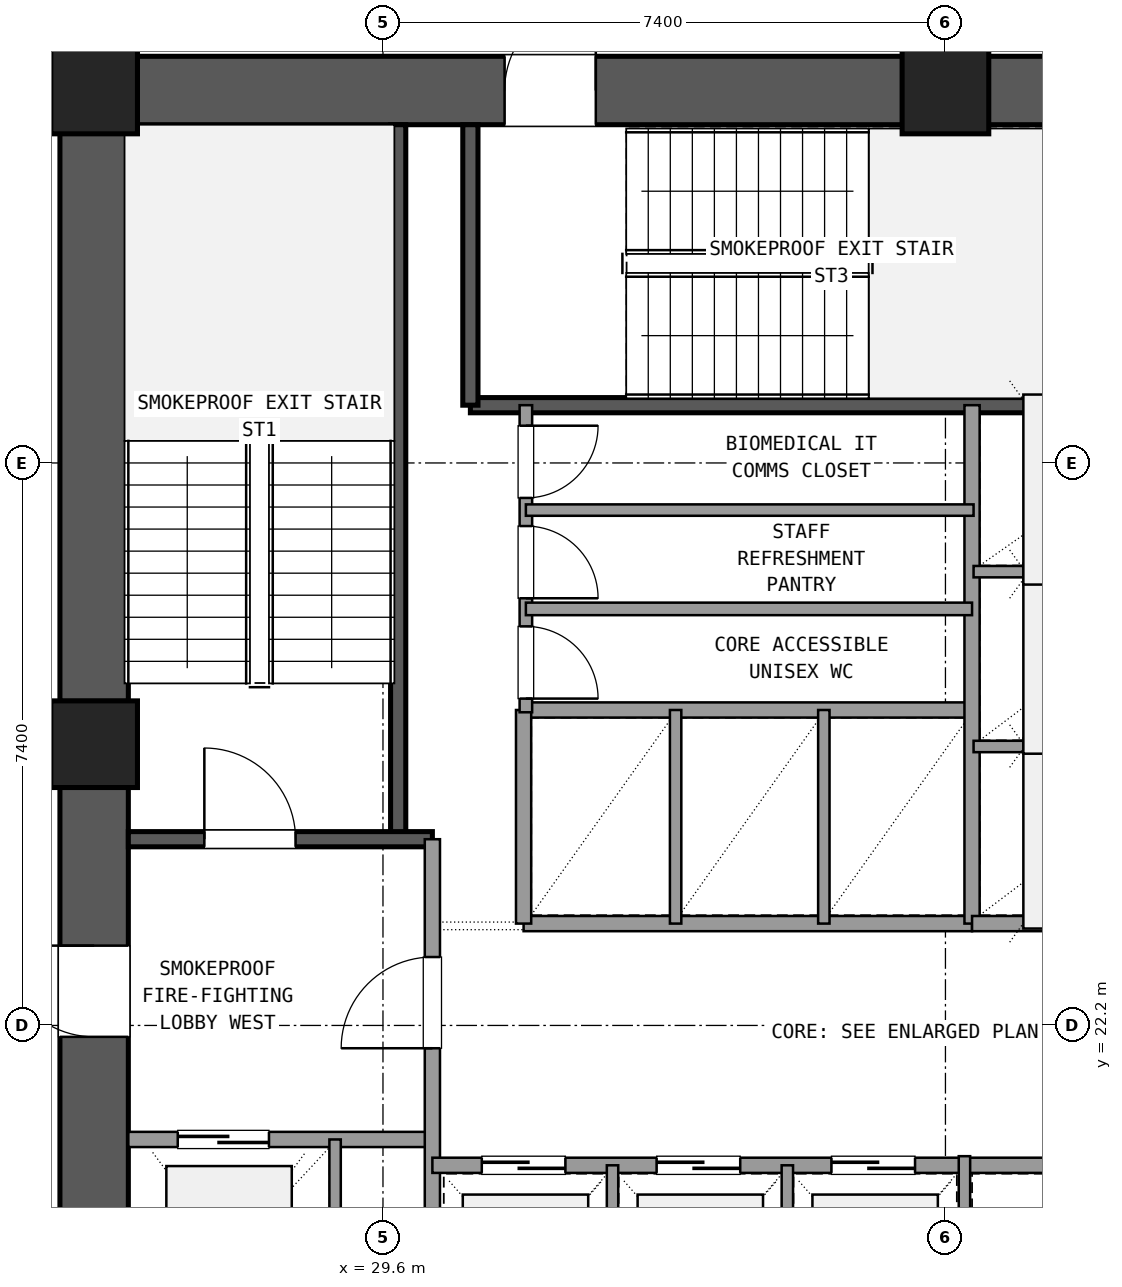
"""IFC4 building model, lengths in metres.
Left out: names, types, materials, properties, quantities, classifications, styles, units other than length and angle.
Written with IfcOpenShell. Run it as: python <this file> out.ifc"""

import sys

from ifc_helpers import new_model, si_unit, direction, frame, frame_2d, origin, origin_2d, place, context, subcontext, project, spatial, rectangle, extrude, element, fill, save


model = new_model("IFC4")
c1 = context("Model", 3, precision=1e-05, world=origin(), true_north=direction((0.0, 1.0)))
c2 = subcontext(c1, "Body", "Model", "MODEL_VIEW")
j1 = project(units=[si_unit("LENGTHUNIT", "METRE"), si_unit("PLANEANGLEUNIT", "RADIAN")], contexts=[c1])
p1 = place(None, origin())
s1 = spatial("IfcSite", under=j1, at=p1, CompositionType="ELEMENT")
p2 = place(p1, origin())
s2 = spatial("IfcBuilding", under=s1, at=p2, CompositionType="ELEMENT")
p3 = place(p2, frame((0.0, 0.0, 14.4)))
s3 = spatial("IfcBuildingStorey", under=s2, at=p3, CompositionType="ELEMENT", Elevation=14.4)
for number, where, z_axis, x_axis in (
    (1, (37.0, 34.5, 0.0), (0.0, 0.0, 1.0), (1.0, 0.0, 0.0)),
    (2, (25.8, 34.5, 0.0), (0.0, 0.0, 1.0), (1.0, 0.0, 0.0)),
    (3, (25.8, 25.9, 0.0), (0.0, 0.0, 1.0), (1.0, 0.0, 0.0)),
):
    element("IfcColumn", number, at=place(p3, frame(where, z_axis=z_axis, x_axis=x_axis)), inside=s3, PredefinedType="COLUMN", context=c2, shape_type="SweptSolid", body=[
        extrude(rectangle(XDim=1.14, YDim=1.14, at=origin_2d()), origin(), (0.0, 0.0, 1.0), 4.5),
    ])
p4 = place(p3, frame((47.635, 34.5, 0.0), z_axis=(0.0, 0.0, 1.0), x_axis=(-1.0, 0.0, 0.0)))
e4 = element("IfcWall", 4, at=p4, inside=s3, PredefinedType="SHEAR", context=c2, shape_type="SweptSolid", body=[
    extrude(rectangle(XDim=10.07, YDim=0.9, at=frame_2d((5.035, 0.0))), origin(), (0.0, 0.0, 1.0), 4.2),
])
p5 = place(p4, frame((4.535, 0.0, 0.0)))
e5 = element("IfcOpeningElement", 5, at=p5, cuts=e4, PredefinedType="OPENING", context=c2, shape_type="SweptSolid", body=[
    extrude(rectangle(XDim=1.6, YDim=2.2, at=frame_2d((0.8, 1.1))), frame((0.0, 0.46, 0.0), z_axis=(0.0, -1.0, 0.0), x_axis=(1.0, 0.0, 0.0)), (0.0, 0.0, 1.0), 0.92),
])
p6 = place(p3, frame((36.435, 34.5, 0.0), z_axis=(0.0, 0.0, 1.0), x_axis=(-1.0, 0.0, 0.0)))
e6 = element("IfcWall", 6, at=p6, inside=s3, PredefinedType="SHEAR", context=c2, shape_type="SweptSolid", body=[
    extrude(rectangle(XDim=10.07, YDim=0.9, at=frame_2d((5.035, 0.0))), origin(), (0.0, 0.0, 1.0), 4.2),
])
p7 = place(p6, frame((4.035, 0.0, 0.0)))
e7 = element("IfcOpeningElement", 7, at=p7, cuts=e6, PredefinedType="OPENING", context=c2, shape_type="SweptSolid", body=[
    extrude(rectangle(XDim=1.2, YDim=2.15, at=frame_2d((0.6, 1.075))), frame((0.0, 0.46, 0.0), z_axis=(0.0, -1.0, 0.0), x_axis=(1.0, 0.0, 0.0)), (0.0, 0.0, 1.0), 0.92),
])
p8 = place(p3, frame((25.8, 33.935, 0.0), z_axis=(0.0, 0.0, 1.0), x_axis=(0.0, -1.0, 0.0)))
e8 = element("IfcWall", 8, at=p8, inside=s3, PredefinedType="SHEAR", context=c2, shape_type="SweptSolid", body=[
    extrude(rectangle(XDim=7.47, YDim=0.9, at=frame_2d((3.735, 0.0))), origin(), (0.0, 0.0, 1.0), 4.2),
])
p9 = place(p3, frame((25.8, 25.335, 0.0), z_axis=(0.0, 0.0, 1.0), x_axis=(0.0, -1.0, 0.0)))
e9 = element("IfcWall", 9, at=p9, inside=s3, PredefinedType="SHEAR", context=c2, shape_type="SweptSolid", body=[
    extrude(rectangle(XDim=7.47, YDim=0.9, at=frame_2d((3.735, 0.0))), origin(), (0.0, 0.0, 1.0), 4.2),
])
p10 = place(p9, frame((2.085, 0.0, 0.0)))
e10 = element("IfcOpeningElement", 10, at=p10, cuts=e9, PredefinedType="OPENING", context=c2, shape_type="SweptSolid", body=[
    extrude(rectangle(XDim=1.2, YDim=2.15, at=frame_2d((0.6, 1.075))), frame((0.0, 0.46, 0.0), z_axis=(0.0, -1.0, 0.0), x_axis=(1.0, 0.0, 0.0)), (0.0, 0.0, 1.0), 0.92),
])
p11 = place(p3, frame((29.8, 24.65, 0.0), z_axis=(0.0, 0.0, 1.0), x_axis=(0.0, 1.0, 0.0)))
e11 = element("IfcWall", 11, at=p11, inside=s3, PredefinedType="SHEAR", context=c2, shape_type="SweptSolid", body=[
    extrude(rectangle(XDim=9.4, YDim=0.2, at=frame_2d((4.7, 0.0))), origin(), (0.0, 0.0, 1.0), 4.2),
])
p12 = place(p3, frame((26.25, 24.65, 0.0), z_axis=(0.0, 0.0, 1.0), x_axis=(1.0, 0.0, 0.0)))
e12 = element("IfcWall", 12, at=p12, inside=s3, PredefinedType="SHEAR", context=c2, shape_type="SweptSolid", body=[
    extrude(rectangle(XDim=4.0, YDim=0.2, at=frame_2d((2.0, 0.0))), origin(), (0.0, 0.0, 1.0), 4.2),
])
p13 = place(p12, frame((1.0, 0.0, 0.0)))
e13 = element("IfcOpeningElement", 13, at=p13, cuts=e12, PredefinedType="OPENING", context=c2, shape_type="SweptSolid", body=[
    extrude(rectangle(XDim=1.2, YDim=2.15, at=frame_2d((0.6, 1.075))), frame((0.0, 0.11, 0.0), z_axis=(0.0, -1.0, 0.0), x_axis=(1.0, 0.0, 0.0)), (0.0, 0.0, 1.0), 0.22),
])
p14 = place(p3, frame((30.75, 30.36, 0.0), z_axis=(0.0, 0.0, 1.0), x_axis=(1.0, 0.0, 0.0)))
e14 = element("IfcWall", 14, at=p14, inside=s3, PredefinedType="SHEAR", context=c2, shape_type="SweptSolid", body=[
    extrude(rectangle(XDim=9.5, YDim=0.2, at=frame_2d((4.75, 0.0))), origin(), (0.0, 0.0, 1.0), 4.2),
])
p15 = place(p3, frame((30.75, 30.36, 0.0), z_axis=(0.0, 0.0, 1.0), x_axis=(0.0, 1.0, 0.0)))
e15 = element("IfcWall", 15, at=p15, inside=s3, PredefinedType="SHEAR", context=c2, shape_type="SweptSolid", body=[
    extrude(rectangle(XDim=3.69, YDim=0.2, at=frame_2d((1.845, 0.0))), origin(), (0.0, 0.0, 1.0), 4.2),
])
p16 = place(p3, frame((26.25, 20.7, 0.0), z_axis=(0.0, 0.0, 1.0), x_axis=(1.0, 0.0, 0.0)))
e16 = element("IfcWall", 16, at=p16, inside=s3, PredefinedType="SOLIDWALL", context=c2, shape_type="SweptSolid", body=[
    extrude(rectangle(XDim=4.0, YDim=0.2, at=frame_2d((2.0, 0.0))), origin(), (0.0, 0.0, 1.0), 3.21),
])
p17 = place(p16, frame((0.65, 0.0, 0.0)))
e17 = element("IfcOpeningElement", 17, at=p17, cuts=e16, PredefinedType="OPENING", context=c2, shape_type="SweptSolid", body=[
    extrude(rectangle(XDim=1.2, YDim=2.15, at=frame_2d((0.6, 1.075))), frame((0.0, 0.11, 0.0), z_axis=(0.0, -1.0, 0.0), x_axis=(1.0, 0.0, 0.0)), (0.0, 0.0, 1.0), 0.22),
])
p18 = place(p3, frame((30.25, 17.75, 0.0), z_axis=(0.0, 0.0, 1.0), x_axis=(0.0, 1.0, 0.0)))
e18 = element("IfcWall", 18, at=p18, inside=s3, PredefinedType="SOLIDWALL", context=c2, shape_type="SweptSolid", body=[
    extrude(rectangle(XDim=6.9, YDim=0.2, at=frame_2d((3.45, 0.0))), origin(), (0.0, 0.0, 1.0), 3.21),
])
p19 = place(p18, frame((4.15, 0.0, 0.0)))
e19 = element("IfcOpeningElement", 19, at=p19, cuts=e18, PredefinedType="OPENING", context=c2, shape_type="SweptSolid", body=[
    extrude(rectangle(XDim=1.2, YDim=2.15, at=frame_2d((0.6, 1.075))), frame((0.0, 0.11, 0.0), z_axis=(0.0, -1.0, 0.0), x_axis=(1.0, 0.0, 0.0)), (0.0, 0.0, 1.0), 0.22),
])
p20 = place(p3, frame((28.97, 17.75, 0.0), z_axis=(0.0, 0.0, 1.0), x_axis=(0.0, 1.0, 0.0)))
e20 = element("IfcWall", 20, at=p20, inside=s3, PredefinedType="PARTITIONING", context=c2, shape_type="SweptSolid", body=[
    extrude(rectangle(XDim=2.95, YDim=0.15, at=frame_2d((1.475, 0.0))), origin(), (0.0, 0.0, 1.0), 3.21),
])
p21 = place(p3, frame((30.25, 20.36, 0.0), z_axis=(0.0, 0.0, 1.0), x_axis=(1.0, 0.0, 0.0)))
e21 = element("IfcWall", 21, at=p21, inside=s3, PredefinedType="SOLIDWALL", context=c2, shape_type="SweptSolid", body=[
    extrude(rectangle(XDim=7.0, YDim=0.2, at=frame_2d((3.5, 0.0))), origin(), (0.0, 0.0, 1.0), 3.21),
])
p22 = place(p21, frame((0.65, 0.0, 0.0)))
e22 = element("IfcOpeningElement", 22, at=p22, cuts=e21, PredefinedType="OPENING", context=c2, shape_type="SweptSolid", body=[
    extrude(rectangle(XDim=1.1, YDim=2.15, at=frame_2d((0.55, 1.075))), frame((0.0, 0.11, 0.0), z_axis=(0.0, -1.0, 0.0), x_axis=(1.0, 0.0, 0.0)), (0.0, 0.0, 1.0), 0.22),
])
p23 = place(p21, frame((2.95, 0.0, 0.0)))
e23 = element("IfcOpeningElement", 23, at=p23, cuts=e21, PredefinedType="OPENING", context=c2, shape_type="SweptSolid", body=[
    extrude(rectangle(XDim=1.1, YDim=2.15, at=frame_2d((0.55, 1.075))), frame((0.0, 0.11, 0.0), z_axis=(0.0, -1.0, 0.0), x_axis=(1.0, 0.0, 0.0)), (0.0, 0.0, 1.0), 0.22),
])
p24 = place(p21, frame((5.25, 0.0, 0.0)))
e24 = element("IfcOpeningElement", 24, at=p24, cuts=e21, PredefinedType="OPENING", context=c2, shape_type="SweptSolid", body=[
    extrude(rectangle(XDim=1.1, YDim=2.15, at=frame_2d((0.55, 1.075))), frame((0.0, 0.11, 0.0), z_axis=(0.0, -1.0, 0.0), x_axis=(1.0, 0.0, 0.0)), (0.0, 0.0, 1.0), 0.22),
])
for number, where, z_axis, x_axis in (
    (25, (32.62, 17.75, 0.0), (0.0, 0.0, 1.0), (0.0, 1.0, 0.0)),
    (26, (34.92, 17.75, 0.0), (0.0, 0.0, 1.0), (0.0, 1.0, 0.0)),
):
    element("IfcWall", number, at=place(p3, frame(where, z_axis=z_axis, x_axis=x_axis)), inside=s3, PredefinedType="PARTITIONING", context=c2, shape_type="SweptSolid", body=[
        extrude(rectangle(XDim=2.61, YDim=0.15, at=frame_2d((1.305, 0.0))), origin(), (0.0, 0.0, 1.0), 3.21),
    ])
p25 = place(p3, frame((37.25, 20.36, 0.0), z_axis=(0.0, 0.0, 1.0), x_axis=(1.0, 0.0, 0.0)))
e27 = element("IfcWall", 27, at=p25, inside=s3, PredefinedType="SOLIDWALL", context=c2, shape_type="SweptSolid", body=[
    extrude(rectangle(XDim=6.1, YDim=0.2, at=frame_2d((3.05, 0.0))), origin(), (0.0, 0.0, 1.0), 3.21),
])
p26 = place(p3, frame((37.25, 17.75, 0.0), z_axis=(0.0, 0.0, 1.0), x_axis=(0.0, 1.0, 0.0)))
e28 = element("IfcWall", 28, at=p26, inside=s3, PredefinedType="PARTITIONING", context=c2, shape_type="SweptSolid", body=[
    extrude(rectangle(XDim=2.73, YDim=0.15, at=frame_2d((1.365, 0.0))), origin(), (0.0, 0.0, 1.0), 3.21),
])
for number, where, z_axis, x_axis in (
    (29, (31.45, 23.54, 0.0), (0.0, 0.0, 1.0), (1.0, 0.0, 0.0)),
    (30, (31.45, 26.35, 0.0), (0.0, 0.0, 1.0), (1.0, 0.0, 0.0)),
):
    element("IfcWall", number, at=place(p3, frame(where, z_axis=z_axis, x_axis=x_axis)), inside=s3, PredefinedType="SOLIDWALL", context=c2, shape_type="SweptSolid", body=[
        extrude(rectangle(XDim=5.9, YDim=0.2, at=frame_2d((2.95, 0.0))), origin(), (0.0, 0.0, 1.0), 3.21),
    ])
p27 = place(p3, frame((31.45, 23.54, 0.0), z_axis=(0.0, 0.0, 1.0), x_axis=(0.0, 1.0, 0.0)))
e31 = element("IfcWall", 31, at=p27, inside=s3, PredefinedType="SOLIDWALL", context=c2, shape_type="SweptSolid", body=[
    extrude(rectangle(XDim=2.81, YDim=0.2, at=frame_2d((1.405, 0.0))), origin(), (0.0, 0.0, 1.0), 3.21),
])
for number, where, z_axis, x_axis in (
    (32, (33.45, 23.54, 0.0), (0.0, 0.0, 1.0), (0.0, 1.0, 0.0)),
    (33, (35.4, 23.54, 0.0), (0.0, 0.0, 1.0), (0.0, 1.0, 0.0)),
):
    element("IfcWall", number, at=place(p3, frame(where, z_axis=z_axis, x_axis=x_axis)), inside=s3, PredefinedType="PARTITIONING", context=c2, shape_type="SweptSolid", body=[
        extrude(rectangle(XDim=2.81, YDim=0.15, at=frame_2d((1.405, 0.0))), origin(), (0.0, 0.0, 1.0), 3.21),
    ])
p28 = place(p3, frame((37.35, 23.54, 0.0), z_axis=(0.0, 0.0, 1.0), x_axis=(0.0, 1.0, 0.0)))
e34 = element("IfcWall", 34, at=p28, inside=s3, PredefinedType="SOLIDWALL", context=c2, shape_type="SweptSolid", body=[
    extrude(rectangle(XDim=6.82, YDim=0.2, at=frame_2d((3.41, 0.0))), origin(), (0.0, 0.0, 1.0), 3.21),
])
p29 = place(p3, frame((37.35, 23.54, 0.0), z_axis=(0.0, 0.0, 1.0), x_axis=(1.0, 0.0, 0.0)))
e35 = element("IfcWall", 35, at=p29, inside=s3, PredefinedType="SOLIDWALL", context=c2, shape_type="SweptSolid", body=[
    extrude(rectangle(XDim=3.05, YDim=0.2, at=frame_2d((1.525, 0.0))), origin(), (0.0, 0.0, 1.0), 3.21),
])
for number, where, z_axis, x_axis in (
    (36, (37.37, 25.87, 0.0), (0.0, 0.0, 1.0), (1.0, 0.0, 0.0)),
    (37, (37.37, 28.17, 0.0), (0.0, 0.0, 1.0), (1.0, 0.0, 0.0)),
):
    element("IfcWall", number, at=place(p3, frame(where, z_axis=z_axis, x_axis=x_axis)), inside=s3, PredefinedType="PARTITIONING", context=c2, shape_type="SweptSolid", body=[
        extrude(rectangle(XDim=3.01, YDim=0.15, at=frame_2d((1.505, 0.0))), origin(), (0.0, 0.0, 1.0), 3.21),
    ])
p30 = place(p3, frame((31.48, 26.32, 0.0), z_axis=(0.0, 0.0, 1.0), x_axis=(0.0, 1.0, 0.0)))
e38 = element("IfcWall", 38, at=p30, inside=s3, PredefinedType="PLUMBINGWALL", context=c2, shape_type="SweptSolid", body=[
    extrude(rectangle(XDim=4.04, YDim=0.165, at=frame_2d((2.02, 0.0))), origin(), (0.0, 0.0, 1.0), 3.21),
])
p31 = place(p30, frame((0.18, 0.0, 0.0)))
e39 = element("IfcOpeningElement", 39, at=p31, cuts=e38, PredefinedType="OPENING", context=c2, shape_type="SweptSolid", body=[
    extrude(rectangle(XDim=0.95, YDim=2.1, at=frame_2d((0.475, 1.05))), frame((0.0, 0.093, 0.0), z_axis=(0.0, -1.0, 0.0), x_axis=(1.0, 0.0, 0.0)), (0.0, 0.0, 1.0), 0.185),
])
p32 = place(p30, frame((1.5, 0.0, 0.0)))
e40 = element("IfcOpeningElement", 40, at=p32, cuts=e38, PredefinedType="OPENING", context=c2, shape_type="SweptSolid", body=[
    extrude(rectangle(XDim=0.95, YDim=2.1, at=frame_2d((0.475, 1.05))), frame((0.0, 0.093, 0.0), z_axis=(0.0, -1.0, 0.0), x_axis=(1.0, 0.0, 0.0)), (0.0, 0.0, 1.0), 0.185),
])
p33 = place(p30, frame((2.82, 0.0, 0.0)))
e41 = element("IfcOpeningElement", 41, at=p33, cuts=e38, PredefinedType="OPENING", context=c2, shape_type="SweptSolid", body=[
    extrude(rectangle(XDim=0.95, YDim=2.1, at=frame_2d((0.475, 1.05))), frame((0.0, 0.093, 0.0), z_axis=(0.0, -1.0, 0.0), x_axis=(1.0, 0.0, 0.0)), (0.0, 0.0, 1.0), 0.185),
])
p34 = place(p3, frame((31.48, 27.68, 0.0), z_axis=(0.0, 0.0, 1.0), x_axis=(1.0, 0.0, 0.0)))
e42 = element("IfcWall", 42, at=p34, inside=s3, PredefinedType="PLUMBINGWALL", context=c2, shape_type="SweptSolid", body=[
    extrude(rectangle(XDim=5.87, YDim=0.165, at=frame_2d((2.935, 0.0))), origin(), (0.0, 0.0, 1.0), 3.21),
])
p35 = place(p3, frame((31.48, 28.98, 0.0), z_axis=(0.0, 0.0, 1.0), x_axis=(1.0, 0.0, 0.0)))
e43 = element("IfcWall", 43, at=p35, inside=s3, PredefinedType="PARTITIONING", context=c2, shape_type="SweptSolid", body=[
    extrude(rectangle(XDim=5.89, YDim=0.15, at=frame_2d((2.945, 0.0))), origin(), (0.0, 0.0, 1.0), 3.21),
])
p36 = place(p13, origin())
e44 = element("IfcDoor", 44, at=p36, inside=s3, OperationType="SINGLE_SWING_LEFT", PredefinedType="DOOR", context=c2, shape_type="SweptSolid", body=[
    extrude(rectangle(XDim=1.2, YDim=2.15, at=frame_2d((0.6, 1.075))), frame((0.0, 0.025, 0.0), z_axis=(0.0, -1.0, 0.0), x_axis=(1.0, 0.0, 0.0)), (0.0, 0.0, 1.0), 0.05),
])
fill(e13, e44)
p37 = place(p17, origin())
e45 = element("IfcDoor", 45, at=p37, inside=s3, OperationType="SLIDING_TO_LEFT", PredefinedType="DOOR", context=c2, shape_type="SweptSolid", body=[
    extrude(rectangle(XDim=1.2, YDim=2.15, at=frame_2d((0.6, 1.075))), frame((0.0, 0.025, 0.0), z_axis=(0.0, -1.0, 0.0), x_axis=(1.0, 0.0, 0.0)), (0.0, 0.0, 1.0), 0.05),
])
fill(e17, e45)
p38 = place(p19, origin())
e46 = element("IfcDoor", 46, at=p38, inside=s3, OperationType="SINGLE_SWING_LEFT", PredefinedType="DOOR", context=c2, shape_type="SweptSolid", body=[
    extrude(rectangle(XDim=1.2, YDim=2.15, at=frame_2d((0.6, 1.075))), frame((0.0, 0.025, 0.0), z_axis=(0.0, -1.0, 0.0), x_axis=(1.0, 0.0, 0.0)), (0.0, 0.0, 1.0), 0.05),
])
fill(e19, e46)
p39 = place(p10, frame((1.2, 0.0, 0.0), z_axis=(0.0, 0.0, 1.0), x_axis=(-1.0, 0.0, 0.0)))
e47 = element("IfcDoor", 47, at=p39, inside=s3, OperationType="SINGLE_SWING_LEFT", PredefinedType="DOOR", context=c2, shape_type="SweptSolid", body=[
    extrude(rectangle(XDim=1.2, YDim=2.15, at=frame_2d((0.6, 1.075))), frame((0.0, 0.025, 0.0), z_axis=(0.0, -1.0, 0.0), x_axis=(1.0, 0.0, 0.0)), (0.0, 0.0, 1.0), 0.05),
])
fill(e10, e47)
p40 = place(p7, frame((1.2, 0.0, 0.0), z_axis=(0.0, 0.0, 1.0), x_axis=(-1.0, 0.0, 0.0)))
e48 = element("IfcDoor", 48, at=p40, inside=s3, OperationType="SINGLE_SWING_LEFT", PredefinedType="DOOR", context=c2, shape_type="SweptSolid", body=[
    extrude(rectangle(XDim=1.2, YDim=2.15, at=frame_2d((0.6, 1.075))), frame((0.0, 0.025, 0.0), z_axis=(0.0, -1.0, 0.0), x_axis=(1.0, 0.0, 0.0)), (0.0, 0.0, 1.0), 0.05),
])
fill(e7, e48)
p41 = place(p22, origin())
e49 = element("IfcDoor", 49, at=p41, inside=s3, OperationType="SLIDING_TO_LEFT", PredefinedType="DOOR", context=c2, shape_type="SweptSolid", body=[
    extrude(rectangle(XDim=1.1, YDim=2.15, at=frame_2d((0.55, 1.075))), frame((0.0, 0.025, 0.0), z_axis=(0.0, -1.0, 0.0), x_axis=(1.0, 0.0, 0.0)), (0.0, 0.0, 1.0), 0.05),
])
fill(e22, e49)
p42 = place(p23, origin())
e50 = element("IfcDoor", 50, at=p42, inside=s3, OperationType="SLIDING_TO_LEFT", PredefinedType="DOOR", context=c2, shape_type="SweptSolid", body=[
    extrude(rectangle(XDim=1.1, YDim=2.15, at=frame_2d((0.55, 1.075))), frame((0.0, 0.025, 0.0), z_axis=(0.0, -1.0, 0.0), x_axis=(1.0, 0.0, 0.0)), (0.0, 0.0, 1.0), 0.05),
])
fill(e23, e50)
p43 = place(p24, origin())
e51 = element("IfcDoor", 51, at=p43, inside=s3, OperationType="SLIDING_TO_LEFT", PredefinedType="DOOR", context=c2, shape_type="SweptSolid", body=[
    extrude(rectangle(XDim=1.1, YDim=2.15, at=frame_2d((0.55, 1.075))), frame((0.0, 0.025, 0.0), z_axis=(0.0, -1.0, 0.0), x_axis=(1.0, 0.0, 0.0)), (0.0, 0.0, 1.0), 0.05),
])
fill(e24, e51)
p44 = place(p31, frame((0.95, 0.0, 0.0), z_axis=(0.0, 0.0, 1.0), x_axis=(-1.0, 0.0, 0.0)))
e52 = element("IfcDoor", 52, at=p44, inside=s3, OperationType="SINGLE_SWING_LEFT", PredefinedType="DOOR", context=c2, shape_type="SweptSolid", body=[
    extrude(rectangle(XDim=0.95, YDim=2.1, at=frame_2d((0.475, 1.05))), frame((0.0, 0.025, 0.0), z_axis=(0.0, -1.0, 0.0), x_axis=(1.0, 0.0, 0.0)), (0.0, 0.0, 1.0), 0.05),
])
fill(e39, e52)
p45 = place(p32, frame((0.95, 0.0, 0.0), z_axis=(0.0, 0.0, 1.0), x_axis=(-1.0, 0.0, 0.0)))
e53 = element("IfcDoor", 53, at=p45, inside=s3, OperationType="SINGLE_SWING_LEFT", PredefinedType="DOOR", context=c2, shape_type="SweptSolid", body=[
    extrude(rectangle(XDim=0.95, YDim=2.1, at=frame_2d((0.475, 1.05))), frame((0.0, 0.025, 0.0), z_axis=(0.0, -1.0, 0.0), x_axis=(1.0, 0.0, 0.0)), (0.0, 0.0, 1.0), 0.05),
])
fill(e40, e53)
p46 = place(p33, frame((0.95, 0.0, 0.0), z_axis=(0.0, 0.0, 1.0), x_axis=(-1.0, 0.0, 0.0)))
e54 = element("IfcDoor", 54, at=p46, inside=s3, OperationType="SINGLE_SWING_RIGHT", PredefinedType="DOOR", context=c2, shape_type="SweptSolid", body=[
    extrude(rectangle(XDim=0.95, YDim=2.1, at=frame_2d((0.475, 1.05))), frame((0.0, 0.025, 0.0), z_axis=(0.0, -1.0, 0.0), x_axis=(1.0, 0.0, 0.0)), (0.0, 0.0, 1.0), 0.05),
])
fill(e41, e54)
save(model, sys.argv[1])
